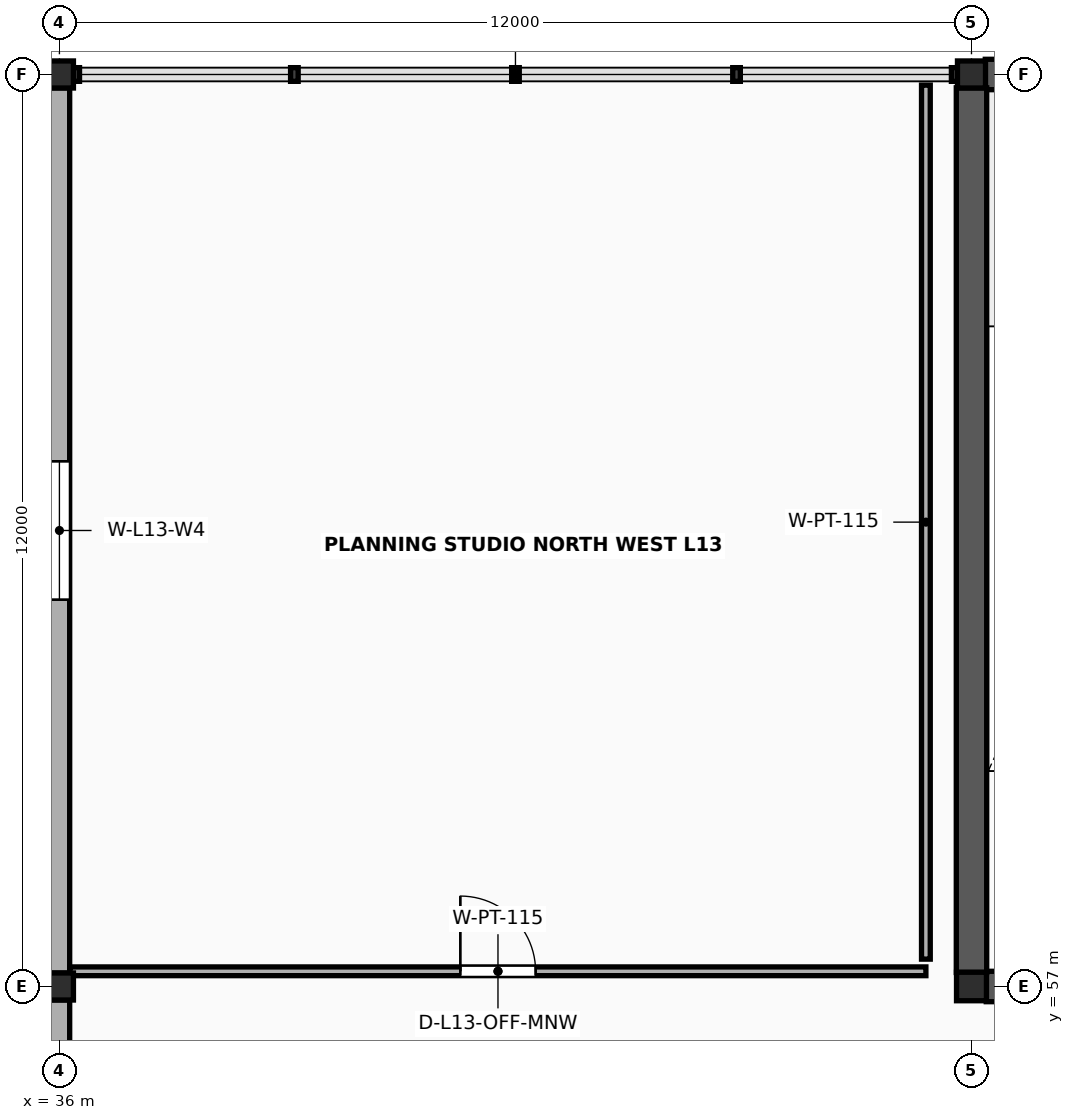
"""IFC4 building model, lengths in metres.
Left out: names, types, materials, properties, quantities, classifications, styles, units other than length and angle.
Written with IfcOpenShell. Run it as: python <this file> out.ifc"""

import sys

from ifc_helpers import new_model, si_unit, direction, frame, frame_2d, origin, origin_2d, place, context, subcontext, project, spatial, rectangle, i_section, extrude, element, fill, save


model = new_model("IFC4")
c1 = context("Model", 3, precision=1e-05, world=origin(), true_north=direction((0.0, 1.0)))
c2 = subcontext(c1, "Body", "Model", "MODEL_VIEW")
j1 = project(units=[si_unit("LENGTHUNIT", "METRE"), si_unit("PLANEANGLEUNIT", "RADIAN")], contexts=[c1])
p1 = place(None, origin())
s1 = spatial("IfcSite", under=j1, at=p1, CompositionType="ELEMENT")
p2 = place(p1, origin())
s2 = spatial("IfcBuilding", under=s1, at=p2, CompositionType="ELEMENT")
p3 = place(p2, frame((0.0, 0.0, 53.6)))
s3 = spatial("IfcBuildingStorey", under=s2, at=p3, CompositionType="ELEMENT", Elevation=53.6)
for number, where, z_axis, x_axis in (
    (1, (36.0, 57.0, 0.0), (0.0, 0.0, 1.0), (1.0, 0.0, 0.0)),
    (2, (36.0, 69.0, 0.0), (0.0, 0.0, 1.0), (1.0, 0.0, 0.0)),
):
    element("IfcColumn", number, at=place(p3, frame(where, z_axis=z_axis, x_axis=x_axis)), inside=s3, PredefinedType="COLUMN", context=c2, shape_type="SweptSolid", body=[
        extrude(i_section(OverallWidth=0.369, OverallDepth=0.356, WebThickness=0.011, FlangeThickness=0.018, FilletRadius=0.018, at=origin_2d()), origin(), (0.0, 0.0, 1.0), 4.0),
    ])
p4 = place(p3, frame((48.0, 57.0, 0.0), z_axis=(0.0, 0.0, 1.0), x_axis=(1.0, 0.0, 0.0)))
e3 = element("IfcColumn", 3, at=p4, inside=s3, PredefinedType="COLUMN", context=c2, shape_type="SweptSolid", body=[
    extrude(i_section(OverallWidth=0.394, OverallDepth=0.375, WebThickness=0.017, FlangeThickness=0.028, FilletRadius=0.018, at=origin_2d()), origin(), (0.0, 0.0, 1.0), 4.0),
])
p5 = place(p3, frame((48.0, 69.0, 0.0), z_axis=(0.0, 0.0, 1.0), x_axis=(1.0, 0.0, 0.0)))
e4 = element("IfcColumn", 4, at=p5, inside=s3, PredefinedType="COLUMN", context=c2, shape_type="SweptSolid", body=[
    extrude(i_section(OverallWidth=0.369, OverallDepth=0.356, WebThickness=0.011, FlangeThickness=0.018, FilletRadius=0.018, at=origin_2d()), origin(), (0.0, 0.0, 1.0), 4.0),
])
p6 = place(p3, frame((48.194, 57.0, 0.0), z_axis=(0.0, 0.0, 1.0), x_axis=(1.0, 0.0, 0.0)))
e5 = element("IfcWall", 5, at=p6, inside=s3, PredefinedType="SHEAR", context=c2, shape_type="SweptSolid", body=[
    extrude(rectangle(XDim=11.612, YDim=0.4, at=frame_2d((5.806, 0.0))), origin(), (0.0, 0.0, 1.0), 3.818),
])
p7 = place(p6, frame((5.006, 0.0, 0.0)))
e6 = element("IfcOpeningElement", 6, at=p7, cuts=e5, PredefinedType="OPENING", context=c2, shape_type="SweptSolid", body=[
    extrude(rectangle(XDim=1.2, YDim=2.2, at=frame_2d((0.6, 1.1))), frame((0.0, 0.215, 0.0), z_axis=(0.0, -1.0, 0.0), x_axis=(1.0, 0.0, 0.0)), (0.0, 0.0, 1.0), 0.43),
])
p8 = place(p6, frame((8.706, 0.0, 0.0)))
e7 = element("IfcOpeningElement", 7, at=p8, cuts=e5, PredefinedType="OPENING", context=c2, shape_type="SweptSolid", body=[
    extrude(rectangle(XDim=1.5, YDim=2.25, at=frame_2d((0.75, 1.125))), frame((0.0, 0.215, 0.0), z_axis=(0.0, -1.0, 0.0), x_axis=(1.0, 0.0, 0.0)), (0.0, 0.0, 1.0), 0.43),
])
p9 = place(p3, frame((48.181, 69.0, 0.0), z_axis=(0.0, 0.0, 1.0), x_axis=(1.0, 0.0, 0.0)))
e8 = element("IfcWall", 8, at=p9, inside=s3, PredefinedType="SHEAR", context=c2, shape_type="SweptSolid", body=[
    extrude(rectangle(XDim=11.637, YDim=0.4, at=frame_2d((5.819, 0.0))), origin(), (0.0, 0.0, 1.0), 3.818),
])
p10 = place(p3, frame((48.0, 57.185, 0.0), z_axis=(0.0, 0.0, 1.0), x_axis=(0.0, 1.0, 0.0)))
e9 = element("IfcWall", 9, at=p10, inside=s3, PredefinedType="SHEAR", context=c2, shape_type="SweptSolid", body=[
    extrude(rectangle(XDim=11.64, YDim=0.4, at=frame_2d((5.82, 0.0))), origin(), (0.0, 0.0, 1.0), 3.818),
])
p11 = place(p3, frame((36.0, 45.176, 0.0), z_axis=(0.0, 0.0, 1.0), x_axis=(0.0, 1.0, 0.0)))
e10 = element("IfcWall", 10, at=p11, inside=s3, PredefinedType="SOLIDWALL", context=c2, shape_type="SweptSolid", body=[
    extrude(rectangle(XDim=11.648, YDim=0.27, at=frame_2d((5.824, 0.0))), origin(), (0.0, 0.0, 1.0), 3.271),
])
p12 = place(p11, frame((4.994, 0.0, 0.78)))
e11 = element("IfcOpeningElement", 11, at=p12, cuts=e10, PredefinedType="OPENING", context=c2, shape_type="SweptSolid", body=[
    extrude(rectangle(XDim=1.66, YDim=1.58, at=frame_2d((0.83, 0.79))), frame((0.0, 0.15, 0.0), z_axis=(0.0, -1.0, 0.0), x_axis=(1.0, 0.0, 0.0)), (0.0, 0.0, 1.0), 0.3),
])
p13 = place(p3, frame((36.0, 57.176, 0.0), z_axis=(0.0, 0.0, 1.0), x_axis=(0.0, 1.0, 0.0)))
e12 = element("IfcWall", 12, at=p13, inside=s3, PredefinedType="SOLIDWALL", context=c2, shape_type="SweptSolid", body=[
    extrude(rectangle(XDim=11.648, YDim=0.27, at=frame_2d((5.824, 0.0))), origin(), (0.0, 0.0, 1.0), 3.271),
])
p14 = place(p13, frame((4.914, 0.0, 0.78)))
e13 = element("IfcOpeningElement", 13, at=p14, cuts=e12, PredefinedType="OPENING", context=c2, shape_type="SweptSolid", body=[
    extrude(rectangle(XDim=1.82, YDim=1.58, at=frame_2d((0.91, 0.79))), frame((0.0, 0.15, 0.0), z_axis=(0.0, -1.0, 0.0), x_axis=(1.0, 0.0, 0.0)), (0.0, 0.0, 1.0), 0.3),
])
p15 = place(p3, frame((36.14, 57.2, 0.0), z_axis=(0.0, 0.0, 1.0), x_axis=(1.0, 0.0, 0.0)))
e14 = element("IfcWall", 14, at=p15, inside=s3, PredefinedType="PARTITIONING", context=c2, shape_type="SweptSolid", body=[
    extrude(rectangle(XDim=11.26, YDim=0.115, at=frame_2d((5.63, 0.0))), origin(), (0.0, 0.0, 1.0), 2.88),
])
p16 = place(p15, frame((5.135, 0.0, 0.0)))
e15 = element("IfcOpeningElement", 15, at=p16, cuts=e14, PredefinedType="OPENING", context=c2, shape_type="SweptSolid", body=[
    extrude(rectangle(XDim=0.99, YDim=2.15, at=frame_2d((0.495, 1.075))), frame((0.0, 0.073, 0.0), z_axis=(0.0, -1.0, 0.0), x_axis=(1.0, 0.0, 0.0)), (0.0, 0.0, 1.0), 0.145),
])
p17 = place(p3, frame((47.4, 57.36, 0.0), z_axis=(0.0, 0.0, 1.0), x_axis=(0.0, 1.0, 0.0)))
e16 = element("IfcWall", 16, at=p17, inside=s3, PredefinedType="PARTITIONING", context=c2, shape_type="SweptSolid", body=[
    extrude(rectangle(XDim=11.5, YDim=0.115, at=frame_2d((5.75, 0.0))), origin(), (0.0, 0.0, 1.0), 2.88),
])
p18 = place(p14, origin())
e17 = element("IfcWindow", 17, at=p18, inside=s3, PartitioningType="DOUBLE_PANEL_VERTICAL", PredefinedType="WINDOW", context=c2, shape_type="SweptSolid", body=[
    extrude(rectangle(XDim=1.82, YDim=1.58, at=frame_2d((0.91, 0.79))), frame((0.0, 0.03, 0.0), z_axis=(0.0, -1.0, 0.0), x_axis=(1.0, 0.0, 0.0)), (0.0, 0.0, 1.0), 0.06),
])
fill(e13, e17)
p19 = place(p16, origin())
e18 = element("IfcDoor", 18, at=p19, inside=s3, OperationType="SINGLE_SWING_LEFT", PredefinedType="DOOR", context=c2, shape_type="SweptSolid", body=[
    extrude(rectangle(XDim=0.99, YDim=2.15, at=frame_2d((0.495, 1.075))), frame((0.0, 0.025, 0.0), z_axis=(0.0, -1.0, 0.0), x_axis=(1.0, 0.0, 0.0)), (0.0, 0.0, 1.0), 0.05),
])
fill(e15, e18)
save(model, sys.argv[1])
